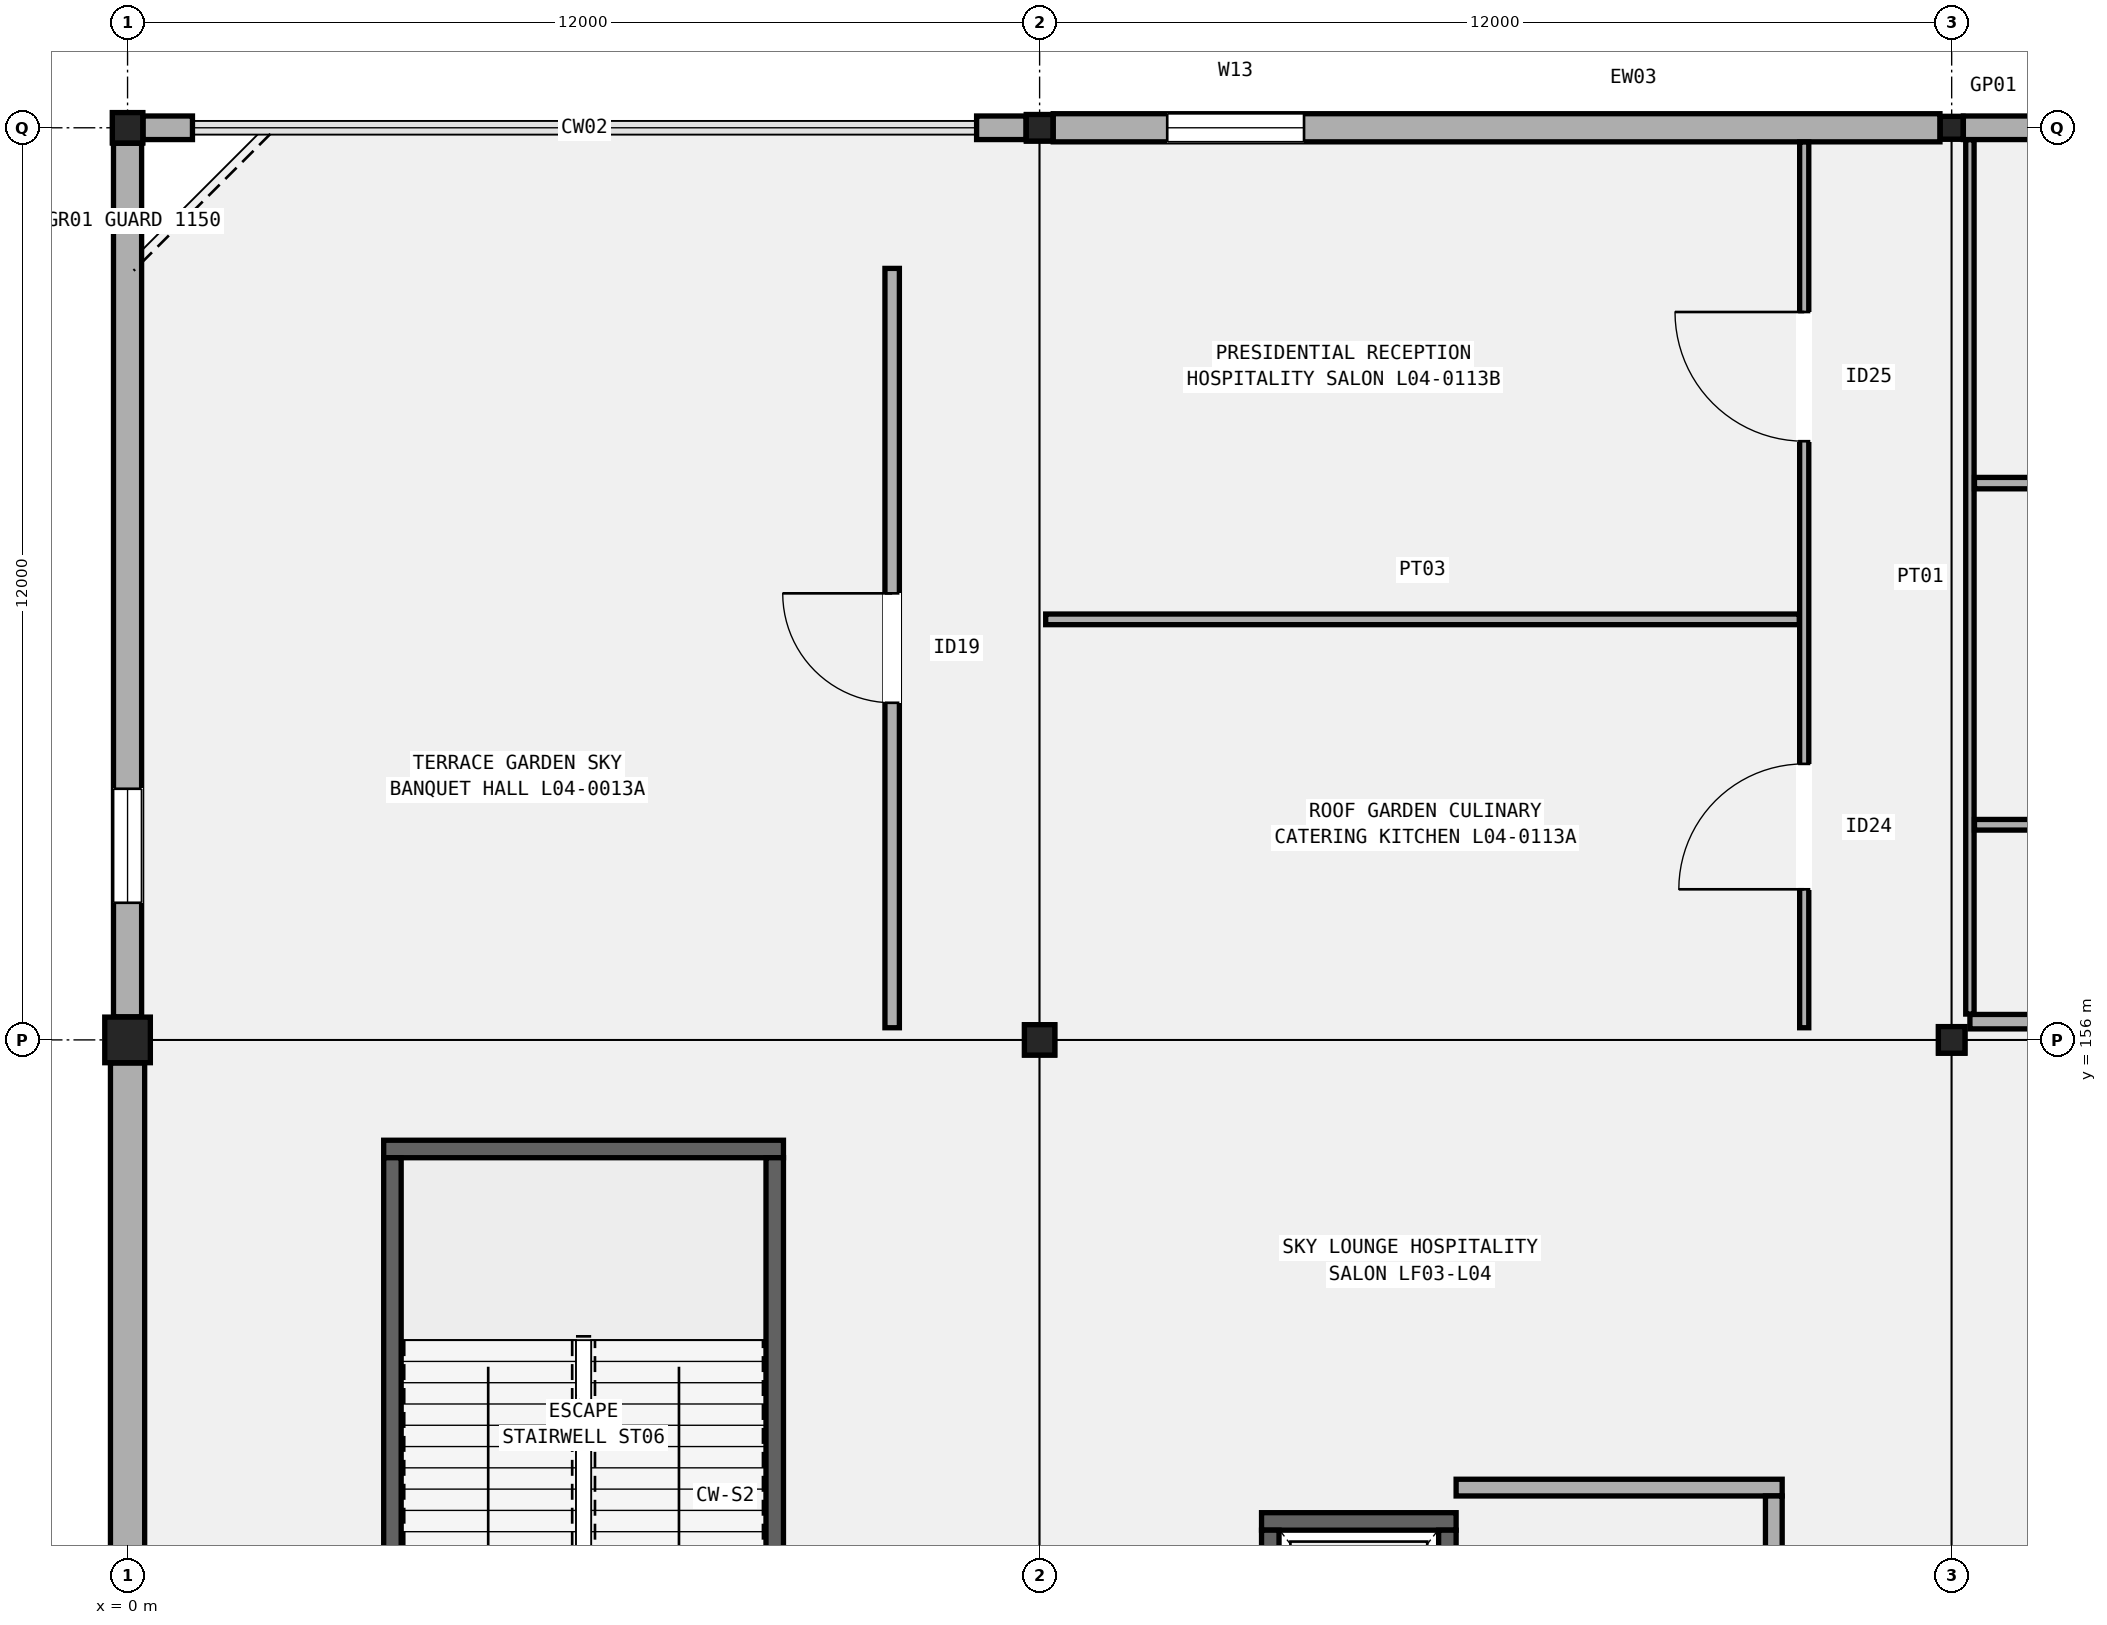
"""IFC4 building model, lengths in metres.
Left out: names, types, materials, properties, quantities, classifications, styles, units other than length and angle.
Written with IfcOpenShell. Run it as: python <this file> out.ifc"""

import sys

from ifc_helpers import new_model, si_unit, direction, frame, frame_2d, origin, origin_2d, place, context, subcontext, project, spatial, rectangle, hollow_rectangle, extrude, element, fill, save


model = new_model("IFC4")
c1 = context("Model", 3, precision=1e-05, world=origin(), true_north=direction((0.0, 1.0)))
c2 = subcontext(c1, "Body", "Model", "MODEL_VIEW")
j1 = project(units=[si_unit("LENGTHUNIT", "METRE"), si_unit("PLANEANGLEUNIT", "RADIAN")], contexts=[c1])
p1 = place(None, origin())
s1 = spatial("IfcSite", under=j1, at=p1, CompositionType="ELEMENT")
p2 = place(p1, origin())
s2 = spatial("IfcBuilding", under=s1, at=p2, CompositionType="ELEMENT")
p3 = place(p2, frame((0.0, 0.0, 20.4)))
s3 = spatial("IfcBuildingStorey", under=s2, at=p3, CompositionType="ELEMENT", Elevation=20.4)
p4 = place(p3, frame((0.0, 156.0, 0.0), z_axis=(0.0, 0.0, 1.0), x_axis=(1.0, 0.0, 0.0)))
e1 = element("IfcColumn", 1, at=p4, inside=s3, PredefinedType="COLUMN", context=c2, shape_type="SweptSolid", body=[
    extrude(rectangle(XDim=0.6, YDim=0.6, at=origin_2d()), origin(), (0.0, 0.0, 1.0), 5.4),
])
for number, where, z_axis, x_axis in (
    (2, (0.0, 168.0, 0.0), (0.0, 0.0, 1.0), (1.0, 0.0, 0.0)),
    (3, (12.0, 156.0, 0.0), (0.0, 0.0, 1.0), (1.0, 0.0, 0.0)),
):
    element("IfcColumn", number, at=place(p3, frame(where, z_axis=z_axis, x_axis=x_axis)), inside=s3, PredefinedType="COLUMN", context=c2, shape_type="SweptSolid", body=[
        extrude(hollow_rectangle(XDim=0.4, YDim=0.4, WallThickness=0.016, InnerFilletRadius=0.016, OuterFilletRadius=0.032, at=origin_2d()), origin(), (0.0, 0.0, 1.0), 5.4),
    ])
for number, where, z_axis, x_axis in (
    (4, (12.0, 168.0, 0.0), (0.0, 0.0, 1.0), (1.0, 0.0, 0.0)),
    (5, (24.0, 156.0, 0.0), (0.0, 0.0, 1.0), (1.0, 0.0, 0.0)),
):
    element("IfcColumn", number, at=place(p3, frame(where, z_axis=z_axis, x_axis=x_axis)), inside=s3, PredefinedType="COLUMN", context=c2, shape_type="SweptSolid", body=[
        extrude(hollow_rectangle(XDim=0.35, YDim=0.35, WallThickness=0.016, InnerFilletRadius=0.016, OuterFilletRadius=0.032, at=origin_2d()), origin(), (0.0, 0.0, 1.0), 5.4),
    ])
p5 = place(p3, frame((24.0, 168.0, 0.0), z_axis=(0.0, 0.0, 1.0), x_axis=(1.0, 0.0, 0.0)))
e6 = element("IfcColumn", 6, at=p5, inside=s3, PredefinedType="COLUMN", context=c2, shape_type="SweptSolid", body=[
    extrude(hollow_rectangle(XDim=0.3, YDim=0.3, WallThickness=0.012, InnerFilletRadius=0.012, OuterFilletRadius=0.024, at=origin_2d()), origin(), (0.0, 0.0, 1.0), 5.4),
])
p6 = place(p3, frame((0.0, 144.354, 0.0), z_axis=(0.0, 0.0, 1.0), x_axis=(0.0, 1.0, 0.0)))
e7 = element("IfcWall", 7, at=p6, inside=s3, PredefinedType="SOLIDWALL", context=c2, shape_type="SweptSolid", body=[
    extrude(rectangle(XDim=11.342, YDim=0.45, at=frame_2d((5.671, 0.0))), origin(), (0.0, 0.0, 1.0), 4.48),
])
p7 = place(p6, frame((1.5, 0.0, 0.95)))
e8 = element("IfcOpeningElement", 8, at=p7, cuts=e7, PredefinedType="OPENING", context=c2, shape_type="SweptSolid", body=[
    extrude(rectangle(XDim=1.5, YDim=1.8, at=frame_2d((0.75, 0.9))), frame((0.0, 0.235, 0.0), z_axis=(0.0, -1.0, 0.0), x_axis=(1.0, 0.0, 0.0)), (0.0, 0.0, 1.0), 0.47),
])
p8 = place(p3, frame((0.204, 168.0, 0.0), z_axis=(0.0, 0.0, 1.0), x_axis=(1.0, 0.0, 0.0)))
e9 = element("IfcWall", 9, at=p8, inside=s3, PredefinedType="SOLIDWALL", context=c2, shape_type="SweptSolid", body=[
    extrude(rectangle(XDim=0.65, YDim=0.31, at=frame_2d((0.325, 0.0))), origin(), (0.0, 0.0, 1.0), 4.592),
])
p9 = place(p3, frame((11.171, 168.0, 0.0), z_axis=(0.0, 0.0, 1.0), x_axis=(1.0, 0.0, 0.0)))
e10 = element("IfcWall", 10, at=p9, inside=s3, PredefinedType="SOLIDWALL", context=c2, shape_type="SweptSolid", body=[
    extrude(rectangle(XDim=0.65, YDim=0.31, at=frame_2d((0.325, 0.0))), origin(), (0.0, 0.0, 1.0), 4.592),
])
p10 = place(p3, frame((0.0, 156.304, 0.0), z_axis=(0.0, 0.0, 1.0), x_axis=(0.0, 1.0, 0.0)))
e11 = element("IfcWall", 11, at=p10, inside=s3, PredefinedType="SOLIDWALL", context=c2, shape_type="SweptSolid", body=[
    extrude(rectangle(XDim=11.492, YDim=0.37, at=frame_2d((5.746, 0.0))), origin(), (0.0, 0.0, 1.0), 4.58),
])
p11 = place(p10, frame((1.5, 0.0, 0.95)))
e12 = element("IfcOpeningElement", 12, at=p11, cuts=e11, PredefinedType="OPENING", context=c2, shape_type="SweptSolid", body=[
    extrude(rectangle(XDim=1.5, YDim=2.25, at=frame_2d((0.75, 1.125))), frame((0.0, 0.195, 0.0), z_axis=(0.0, -1.0, 0.0), x_axis=(1.0, 0.0, 0.0)), (0.0, 0.0, 1.0), 0.39),
])
p12 = place(p3, frame((12.179, 168.0, 0.0), z_axis=(0.0, 0.0, 1.0), x_axis=(1.0, 0.0, 0.0)))
e13 = element("IfcWall", 13, at=p12, inside=s3, PredefinedType="SOLIDWALL", context=c2, shape_type="SweptSolid", body=[
    extrude(rectangle(XDim=11.667, YDim=0.37, at=frame_2d((5.833, 0.0))), origin(), (0.0, 0.0, 1.0), 4.48),
])
p13 = place(p12, frame((1.5, 0.0, 0.95)))
e14 = element("IfcOpeningElement", 14, at=p13, cuts=e13, PredefinedType="OPENING", context=c2, shape_type="SweptSolid", body=[
    extrude(rectangle(XDim=1.8, YDim=1.75, at=frame_2d((0.9, 0.875))), frame((0.0, 0.195, 0.0), z_axis=(0.0, -1.0, 0.0), x_axis=(1.0, 0.0, 0.0)), (0.0, 0.0, 1.0), 0.39),
])
p14 = place(p3, frame((24.154, 168.0, 0.0), z_axis=(0.0, 0.0, 1.0), x_axis=(1.0, 0.0, 0.0)))
e15 = element("IfcWall", 15, at=p14, inside=s3, PredefinedType="SOLIDWALL", context=c2, shape_type="SweptSolid", body=[
    extrude(rectangle(XDim=12.217, YDim=0.31, at=frame_2d((6.108, 0.0))), origin(), (0.0, 0.0, 1.0), 4.58),
])
p15 = place(p14, frame((1.5, 0.0, 0.95)))
e16 = element("IfcOpeningElement", 16, at=p15, cuts=e15, PredefinedType="OPENING", context=c2, shape_type="SweptSolid", body=[
    extrude(rectangle(XDim=2.25, YDim=1.8, at=frame_2d((1.125, 0.9))), frame((0.0, 0.165, 0.0), z_axis=(0.0, -1.0, 0.0), x_axis=(1.0, 0.0, 0.0)), (0.0, 0.0, 1.0), 0.33),
])
p16 = place(p3, frame((3.37, 154.565, 0.0), z_axis=(0.0, 0.0, 1.0), x_axis=(1.0, 0.0, 0.0)))
e17 = element("IfcWall", 17, at=p16, inside=s3, PredefinedType="SHEAR", context=c2, shape_type="SweptSolid", body=[
    extrude(rectangle(XDim=5.26, YDim=0.23, at=frame_2d((2.63, 0.0))), origin(), (0.0, 0.0, 1.0), 5.18),
])
for number, where, z_axis, x_axis in (
    (18, (3.485, 145.55, 0.0), (0.0, 0.0, 1.0), (0.0, 1.0, 0.0)),
    (19, (8.515, 145.55, 0.0), (0.0, 0.0, 1.0), (0.0, 1.0, 0.0)),
):
    element("IfcWall", number, at=place(p3, frame(where, z_axis=z_axis, x_axis=x_axis)), inside=s3, PredefinedType="SHEAR", context=c2, shape_type="SweptSolid", body=[
        extrude(rectangle(XDim=8.9, YDim=0.23, at=frame_2d((4.45, 0.0))), origin(), (0.0, 0.0, 1.0), 5.18),
    ])
p17 = place(p3, frame((14.92, 149.665, 0.0), z_axis=(0.0, 0.0, 1.0), x_axis=(1.0, 0.0, 0.0)))
e20 = element("IfcWall", 20, at=p17, inside=s3, PredefinedType="SHEAR", context=c2, shape_type="SweptSolid", body=[
    extrude(rectangle(XDim=2.56, YDim=0.23, at=frame_2d((1.28, 0.0))), origin(), (0.0, 0.0, 1.0), 5.18),
])
p18 = place(p3, frame((15.035, 146.85, 0.0), z_axis=(0.0, 0.0, 1.0), x_axis=(0.0, 1.0, 0.0)))
e21 = element("IfcWall", 21, at=p18, inside=s3, PredefinedType="SHEAR", context=c2, shape_type="SweptSolid", body=[
    extrude(rectangle(XDim=2.7, YDim=0.23, at=frame_2d((1.35, 0.0))), origin(), (0.0, 0.0, 1.0), 5.18),
])
p19 = place(p3, frame((17.365, 146.85, 0.0), z_axis=(0.0, 0.0, 1.0), x_axis=(0.0, 1.0, 0.0)))
e22 = element("IfcWall", 22, at=p19, inside=s3, PredefinedType="SHEAR", context=c2, shape_type="SweptSolid", body=[
    extrude(rectangle(XDim=2.7, YDim=0.23, at=frame_2d((1.35, 0.0))), origin(), (0.0, 0.0, 1.0), 5.18),
])
p20 = place(p19, frame((0.8, 0.0, 0.0)))
e23 = element("IfcOpeningElement", 23, at=p20, cuts=e22, PredefinedType="OPENING", context=c2, shape_type="SweptSolid", body=[
    extrude(rectangle(XDim=1.1, YDim=2.15, at=frame_2d((0.55, 1.075))), frame((0.0, 0.125, 0.0), z_axis=(0.0, -1.0, 0.0), x_axis=(1.0, 0.0, 0.0)), (0.0, 0.0, 1.0), 0.25),
])
p21 = place(p3, frame((17.48, 150.11, 0.0), z_axis=(0.0, 0.0, 1.0), x_axis=(1.0, 0.0, 0.0)))
e24 = element("IfcWall", 24, at=p21, inside=s3, PredefinedType="SOLIDWALL", context=c2, shape_type="SweptSolid", body=[
    extrude(rectangle(XDim=4.29, YDim=0.22, at=frame_2d((2.145, 0.0))), origin(), (0.0, 0.0, 1.0), 4.52),
])
p22 = place(p3, frame((21.66, 146.4, 0.0), z_axis=(0.0, 0.0, 1.0), x_axis=(0.0, 1.0, 0.0)))
e25 = element("IfcWall", 25, at=p22, inside=s3, PredefinedType="SOLIDWALL", context=c2, shape_type="SweptSolid", body=[
    extrude(rectangle(XDim=3.6, YDim=0.22, at=frame_2d((1.8, 0.0))), origin(), (0.0, 0.0, 1.0), 4.52),
])
p23 = place(p22, frame((1.15, 0.0, 0.0)))
e26 = element("IfcOpeningElement", 26, at=p23, cuts=e25, PredefinedType="OPENING", context=c2, shape_type="SweptSolid", body=[
    extrude(rectangle(XDim=1.3, YDim=2.15, at=frame_2d((0.65, 1.075))), frame((0.0, 0.12, 0.0), z_axis=(0.0, -1.0, 0.0), x_axis=(1.0, 0.0, 0.0)), (0.0, 0.0, 1.0), 0.24),
])
p24 = place(p3, frame((10.06, 156.16, 0.0), z_axis=(0.0, 0.0, 1.0), x_axis=(0.0, 1.0, 0.0)))
e27 = element("IfcWall", 27, at=p24, inside=s3, PredefinedType="PARTITIONING", context=c2, shape_type="SweptSolid", body=[
    extrude(rectangle(XDim=9.99, YDim=0.19, at=frame_2d((4.995, 0.0))), origin(), (0.0, 0.0, 1.0), 4.52),
])
p25 = place(p24, frame((4.275, 0.0, 0.0)))
e28 = element("IfcOpeningElement", 28, at=p25, cuts=e27, PredefinedType="OPENING", context=c2, shape_type="SweptSolid", body=[
    extrude(rectangle(XDim=1.44, YDim=2.26, at=frame_2d((0.72, 1.13))), frame((0.0, 0.105, 0.0), z_axis=(0.0, -1.0, 0.0), x_axis=(1.0, 0.0, 0.0)), (0.0, 0.0, 1.0), 0.21),
])
p26 = place(p3, frame((22.06, 156.16, 0.0), z_axis=(0.0, 0.0, 1.0), x_axis=(0.0, 1.0, 0.0)))
e29 = element("IfcWall", 29, at=p26, inside=s3, PredefinedType="PARTITIONING", context=c2, shape_type="SweptSolid", body=[
    extrude(rectangle(XDim=11.653, YDim=0.12, at=frame_2d((5.827, 0.0))), origin(), (0.0, 0.0, 1.0), 4.52),
])
p27 = place(p26, frame((1.821, 0.0, 0.0)))
e30 = element("IfcOpeningElement", 30, at=p27, cuts=e29, PredefinedType="OPENING", context=c2, shape_type="SweptSolid", body=[
    extrude(rectangle(XDim=1.65, YDim=2.28, at=frame_2d((0.825, 1.14))), frame((0.0, 0.07, 0.0), z_axis=(0.0, -1.0, 0.0), x_axis=(1.0, 0.0, 0.0)), (0.0, 0.0, 1.0), 0.14),
])
p28 = place(p26, frame((7.716, 0.0, 0.0)))
e31 = element("IfcOpeningElement", 31, at=p28, cuts=e29, PredefinedType="OPENING", context=c2, shape_type="SweptSolid", body=[
    extrude(rectangle(XDim=1.7, YDim=2.32, at=frame_2d((0.85, 1.16))), frame((0.0, 0.07, 0.0), z_axis=(0.0, -1.0, 0.0), x_axis=(1.0, 0.0, 0.0)), (0.0, 0.0, 1.0), 0.14),
])
p29 = place(p3, frame((12.08, 161.533, 0.0), z_axis=(0.0, 0.0, 1.0), x_axis=(1.0, 0.0, 0.0)))
e32 = element("IfcWall", 32, at=p29, inside=s3, PredefinedType="PARTITIONING", context=c2, shape_type="SweptSolid", body=[
    extrude(rectangle(XDim=9.915, YDim=0.14, at=frame_2d((4.958, 0.0))), origin(), (0.0, 0.0, 1.0), 4.52),
])
p30 = place(p3, frame((24.24, 156.24, 0.0), z_axis=(0.0, 0.0, 1.0), x_axis=(1.0, 0.0, 0.0)))
e33 = element("IfcWall", 33, at=p30, inside=s3, PredefinedType="PARTITIONING", context=c2, shape_type="SweptSolid", body=[
    extrude(rectangle(XDim=10.255, YDim=0.19, at=frame_2d((5.127, 0.0))), origin(), (0.0, 0.0, 1.0), 4.44),
])
p31 = place(p3, frame((24.24, 156.34, 0.0), z_axis=(0.0, 0.0, 1.0), x_axis=(0.0, 1.0, 0.0)))
e34 = element("IfcWall", 34, at=p31, inside=s3, PredefinedType="PARTITIONING", context=c2, shape_type="SweptSolid", body=[
    extrude(rectangle(XDim=11.503, YDim=0.11, at=frame_2d((5.751, 0.0))), origin(), (0.0, 0.0, 1.0), 4.44),
])
p32 = place(p3, frame((24.3, 158.83, 0.0), z_axis=(0.0, 0.0, 1.0), x_axis=(1.0, 0.0, 0.0)))
e35 = element("IfcWall", 35, at=p32, inside=s3, PredefinedType="PARTITIONING", context=c2, shape_type="SweptSolid", body=[
    extrude(rectangle(XDim=10.195, YDim=0.14, at=frame_2d((5.098, 0.0))), origin(), (0.0, 0.0, 1.0), 4.52),
])
p33 = place(p3, frame((24.3, 163.325, 0.0), z_axis=(0.0, 0.0, 1.0), x_axis=(1.0, 0.0, 0.0)))
e36 = element("IfcWall", 36, at=p33, inside=s3, PredefinedType="PARTITIONING", context=c2, shape_type="SweptSolid", body=[
    extrude(rectangle(XDim=10.195, YDim=0.15, at=frame_2d((5.098, 0.0))), origin(), (0.0, 0.0, 1.0), 4.52),
])
p34 = place(p11, origin())
e37 = element("IfcWindow", 37, at=p34, inside=s3, PartitioningType="SINGLE_PANEL", PredefinedType="WINDOW", context=c2, shape_type="SweptSolid", body=[
    extrude(rectangle(XDim=1.5, YDim=2.25, at=frame_2d((0.75, 1.125))), frame((0.0, 0.03, 0.0), z_axis=(0.0, -1.0, 0.0), x_axis=(1.0, 0.0, 0.0)), (0.0, 0.0, 1.0), 0.06),
])
fill(e12, e37)
p35 = place(p13, origin())
e38 = element("IfcWindow", 38, at=p35, inside=s3, PartitioningType="SINGLE_PANEL", PredefinedType="WINDOW", context=c2, shape_type="SweptSolid", body=[
    extrude(rectangle(XDim=1.8, YDim=1.75, at=frame_2d((0.9, 0.875))), frame((0.0, 0.03, 0.0), z_axis=(0.0, -1.0, 0.0), x_axis=(1.0, 0.0, 0.0)), (0.0, 0.0, 1.0), 0.06),
])
fill(e14, e38)
p36 = place(p25, origin())
e39 = element("IfcDoor", 39, at=p36, inside=s3, OperationType="SINGLE_SWING_RIGHT", PredefinedType="DOOR", context=c2, shape_type="SweptSolid", body=[
    extrude(rectangle(XDim=1.44, YDim=2.26, at=frame_2d((0.72, 1.13))), frame((0.0, 0.025, 0.0), z_axis=(0.0, -1.0, 0.0), x_axis=(1.0, 0.0, 0.0)), (0.0, 0.0, 1.0), 0.05),
])
fill(e28, e39)
p37 = place(p27, origin())
e40 = element("IfcDoor", 40, at=p37, inside=s3, OperationType="SINGLE_SWING_LEFT", PredefinedType="DOOR", context=c2, shape_type="SweptSolid", body=[
    extrude(rectangle(XDim=1.65, YDim=2.28, at=frame_2d((0.825, 1.14))), frame((0.0, 0.025, 0.0), z_axis=(0.0, -1.0, 0.0), x_axis=(1.0, 0.0, 0.0)), (0.0, 0.0, 1.0), 0.05),
])
fill(e30, e40)
p38 = place(p28, origin())
e41 = element("IfcDoor", 41, at=p38, inside=s3, OperationType="SINGLE_SWING_RIGHT", PredefinedType="DOOR", context=c2, shape_type="SweptSolid", body=[
    extrude(rectangle(XDim=1.7, YDim=2.32, at=frame_2d((0.85, 1.16))), frame((0.0, 0.025, 0.0), z_axis=(0.0, -1.0, 0.0), x_axis=(1.0, 0.0, 0.0)), (0.0, 0.0, 1.0), 0.05),
])
fill(e31, e41)
save(model, sys.argv[1])
